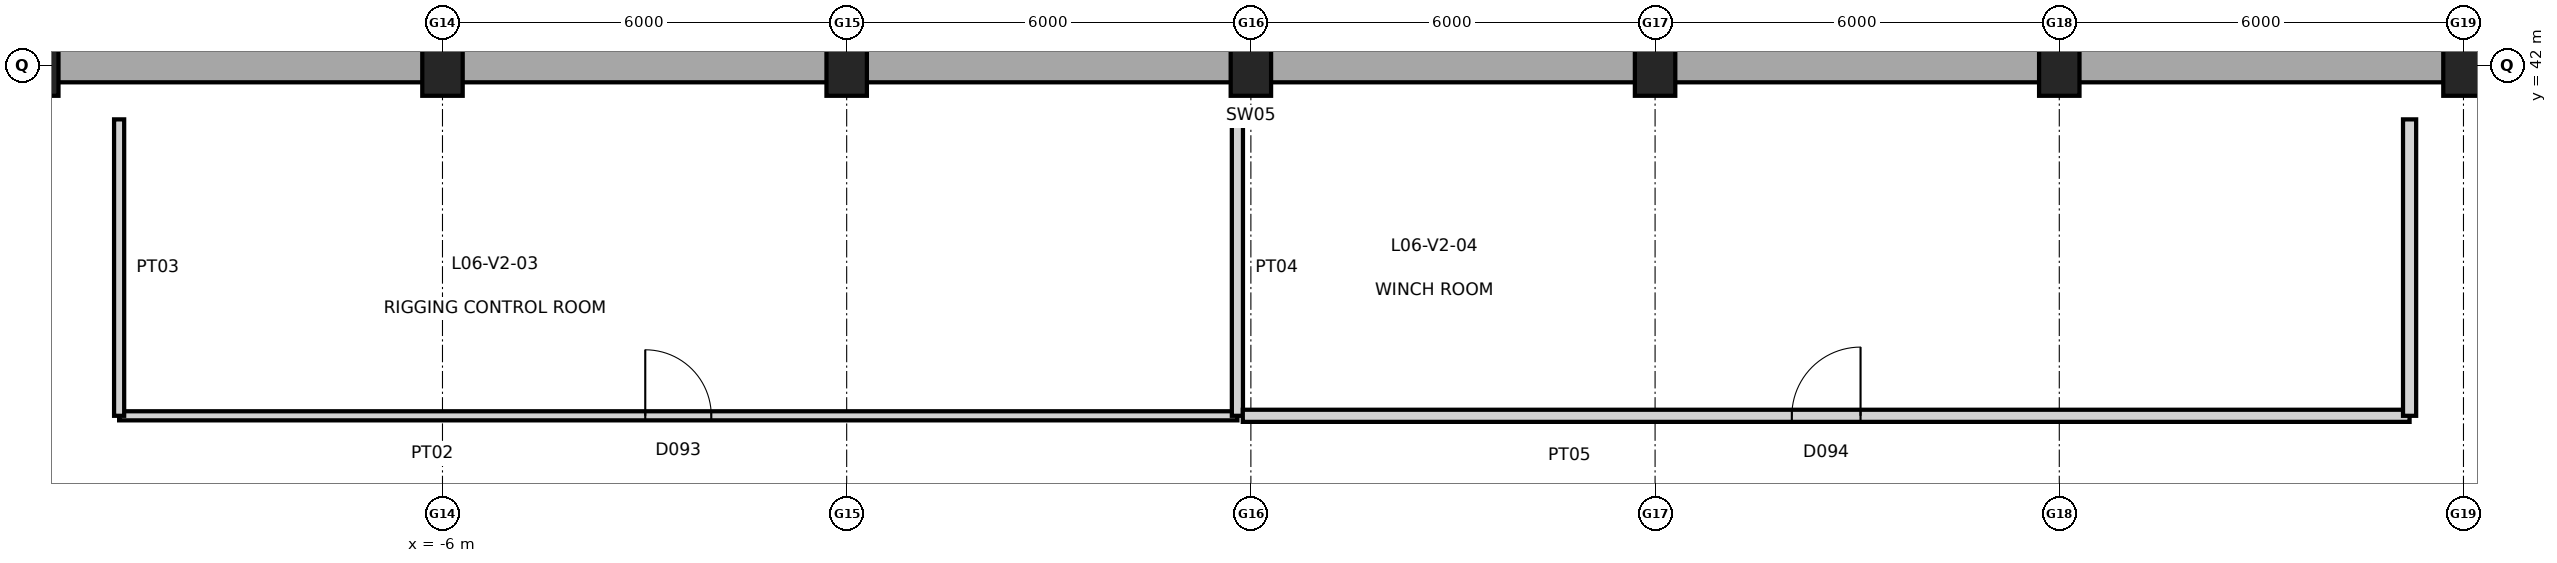
"""IFC4 building model, lengths in metres.
Left out: names, types, materials, properties, quantities, classifications, styles, units other than length and angle.
Written with IfcOpenShell. Run it as: python <this file> out.ifc"""

import sys

from ifc_helpers import new_model, si_unit, direction, frame, frame_2d, origin, origin_2d, place, context, subcontext, project, spatial, rectangle, extrude, element, fill, save


model = new_model("IFC4")
c1 = context("Model", 3, precision=1e-05, world=origin(), true_north=direction((0.0, 1.0)))
c2 = subcontext(c1, "Body", "Model", "MODEL_VIEW")
j1 = project(units=[si_unit("LENGTHUNIT", "METRE"), si_unit("PLANEANGLEUNIT", "RADIAN")], contexts=[c1])
p1 = place(None, origin())
s1 = spatial("IfcSite", under=j1, at=p1, CompositionType="ELEMENT")
p2 = place(p1, origin())
s2 = spatial("IfcBuilding", under=s1, at=p2, CompositionType="ELEMENT")
p3 = place(p2, frame((0.0, 0.0, 30.0)))
s3 = spatial("IfcBuildingStorey", under=s2, at=p3, CompositionType="ELEMENT", Elevation=30.0)
for number, where, z_axis, x_axis in (
    (1, (-12.0, 42.0, 0.0), (0.0, 0.0, 1.0), (1.0, 0.0, 0.0)),
    (2, (-6.0, 42.0, 0.0), (0.0, 0.0, 1.0), (1.0, 0.0, 0.0)),
    (3, (0.0, 42.0, 0.0), (0.0, 0.0, 1.0), (1.0, 0.0, 0.0)),
    (4, (6.0, 42.0, 0.0), (0.0, 0.0, 1.0), (1.0, 0.0, 0.0)),
    (5, (12.0, 42.0, 0.0), (0.0, 0.0, 1.0), (1.0, 0.0, 0.0)),
    (6, (18.0, 42.0, 0.0), (0.0, 0.0, 1.0), (1.0, 0.0, 0.0)),
    (7, (24.0, 42.0, 0.0), (0.0, 0.0, 1.0), (1.0, 0.0, 0.0)),
):
    element("IfcColumn", number, at=place(p3, frame(where, z_axis=z_axis, x_axis=x_axis)), inside=s3, PredefinedType="COLUMN", context=c2, shape_type="SweptSolid", body=[
        extrude(rectangle(XDim=0.6, YDim=0.9, at=origin_2d()), origin(), (0.0, 0.0, 1.0), 6.0),
    ])
p4 = place(p3, frame((-17.0, 42.0, 0.0), z_axis=(0.0, 0.0, 1.0), x_axis=(1.0, 0.0, 0.0)))
e8 = element("IfcWall", 8, at=p4, inside=s3, PredefinedType="SHEAR", context=c2, shape_type="SweptSolid", body=[
    extrude(rectangle(XDim=46.0, YDim=0.5, at=frame_2d((23.0, 0.0))), origin(), (0.0, 0.0, 1.0), 6.0),
])
p5 = place(p3, frame((-10.8, 36.8, 0.0), z_axis=(0.0, 0.0, 1.0), x_axis=(1.0, 0.0, 0.0)))
e9 = element("IfcWall", 9, at=p5, inside=s3, PredefinedType="PARTITIONING", context=c2, shape_type="SweptSolid", body=[
    extrude(rectangle(XDim=16.6, YDim=0.135, at=frame_2d((8.3, 0.0))), origin(), (0.0, 0.0, 1.0), 5.62),
])
p6 = place(p5, frame((7.81, 0.0, 0.0)))
e10 = element("IfcOpeningElement", 10, at=p6, cuts=e9, PredefinedType="OPENING", context=c2, shape_type="SweptSolid", body=[
    extrude(rectangle(XDim=0.98, YDim=2.15, at=frame_2d((0.49, 1.075))), frame((0.0, 0.077, 0.0), z_axis=(0.0, -1.0, 0.0), x_axis=(1.0, 0.0, 0.0)), (0.0, 0.0, 1.0), 0.155),
])
p7 = place(p3, frame((-10.8, 36.8, 0.0), z_axis=(0.0, 0.0, 1.0), x_axis=(0.0, 1.0, 0.0)))
e11 = element("IfcWall", 11, at=p7, inside=s3, PredefinedType="PARTITIONING", context=c2, shape_type="SweptSolid", body=[
    extrude(rectangle(XDim=4.4, YDim=0.15, at=frame_2d((2.2, 0.0))), origin(), (0.0, 0.0, 1.0), 5.62),
])
p8 = place(p3, frame((5.8, 36.8, 0.0), z_axis=(0.0, 0.0, 1.0), x_axis=(0.0, 1.0, 0.0)))
e12 = element("IfcWall", 12, at=p8, inside=s3, PredefinedType="PARTITIONING", context=c2, shape_type="SweptSolid", body=[
    extrude(rectangle(XDim=4.4, YDim=0.165, at=frame_2d((2.2, 0.0))), origin(), (0.0, 0.0, 1.0), 4.79),
])
p9 = place(p3, frame((5.88, 36.8, 0.0), z_axis=(0.0, 0.0, 1.0), x_axis=(1.0, 0.0, 0.0)))
e13 = element("IfcWall", 13, at=p9, inside=s3, PredefinedType="PARTITIONING", context=c2, shape_type="SweptSolid", body=[
    extrude(rectangle(XDim=17.32, YDim=0.18, at=frame_2d((8.66, 0.0))), origin(), (0.0, 0.0, 1.0), 5.62),
])
p10 = place(p9, frame((8.15, 0.0, 0.0)))
e14 = element("IfcOpeningElement", 14, at=p10, cuts=e13, PredefinedType="OPENING", context=c2, shape_type="SweptSolid", body=[
    extrude(rectangle(XDim=1.02, YDim=2.15, at=frame_2d((0.51, 1.075))), frame((0.0, 0.1, 0.0), z_axis=(0.0, -1.0, 0.0), x_axis=(1.0, 0.0, 0.0)), (0.0, 0.0, 1.0), 0.2),
])
p11 = place(p3, frame((23.2, 36.8, 0.0), z_axis=(0.0, 0.0, 1.0), x_axis=(0.0, 1.0, 0.0)))
e15 = element("IfcWall", 15, at=p11, inside=s3, PredefinedType="PARTITIONING", context=c2, shape_type="SweptSolid", body=[
    extrude(rectangle(XDim=4.4, YDim=0.195, at=frame_2d((2.2, 0.0))), origin(), (0.0, 0.0, 1.0), 5.62),
])
p12 = place(p6, origin())
e16 = element("IfcDoor", 16, at=p12, inside=s3, OperationType="SINGLE_SWING_LEFT", PredefinedType="DOOR", context=c2, shape_type="SweptSolid", body=[
    extrude(rectangle(XDim=0.98, YDim=2.15, at=frame_2d((0.49, 1.075))), frame((0.0, 0.025, 0.0), z_axis=(0.0, -1.0, 0.0), x_axis=(1.0, 0.0, 0.0)), (0.0, 0.0, 1.0), 0.05),
])
fill(e10, e16)
p13 = place(p10, origin())
e17 = element("IfcDoor", 17, at=p13, inside=s3, OperationType="SINGLE_SWING_RIGHT", PredefinedType="DOOR", context=c2, shape_type="SweptSolid", body=[
    extrude(rectangle(XDim=1.02, YDim=2.15, at=frame_2d((0.51, 1.075))), frame((0.0, 0.025, 0.0), z_axis=(0.0, -1.0, 0.0), x_axis=(1.0, 0.0, 0.0)), (0.0, 0.0, 1.0), 0.05),
])
fill(e14, e17)
save(model, sys.argv[1])
